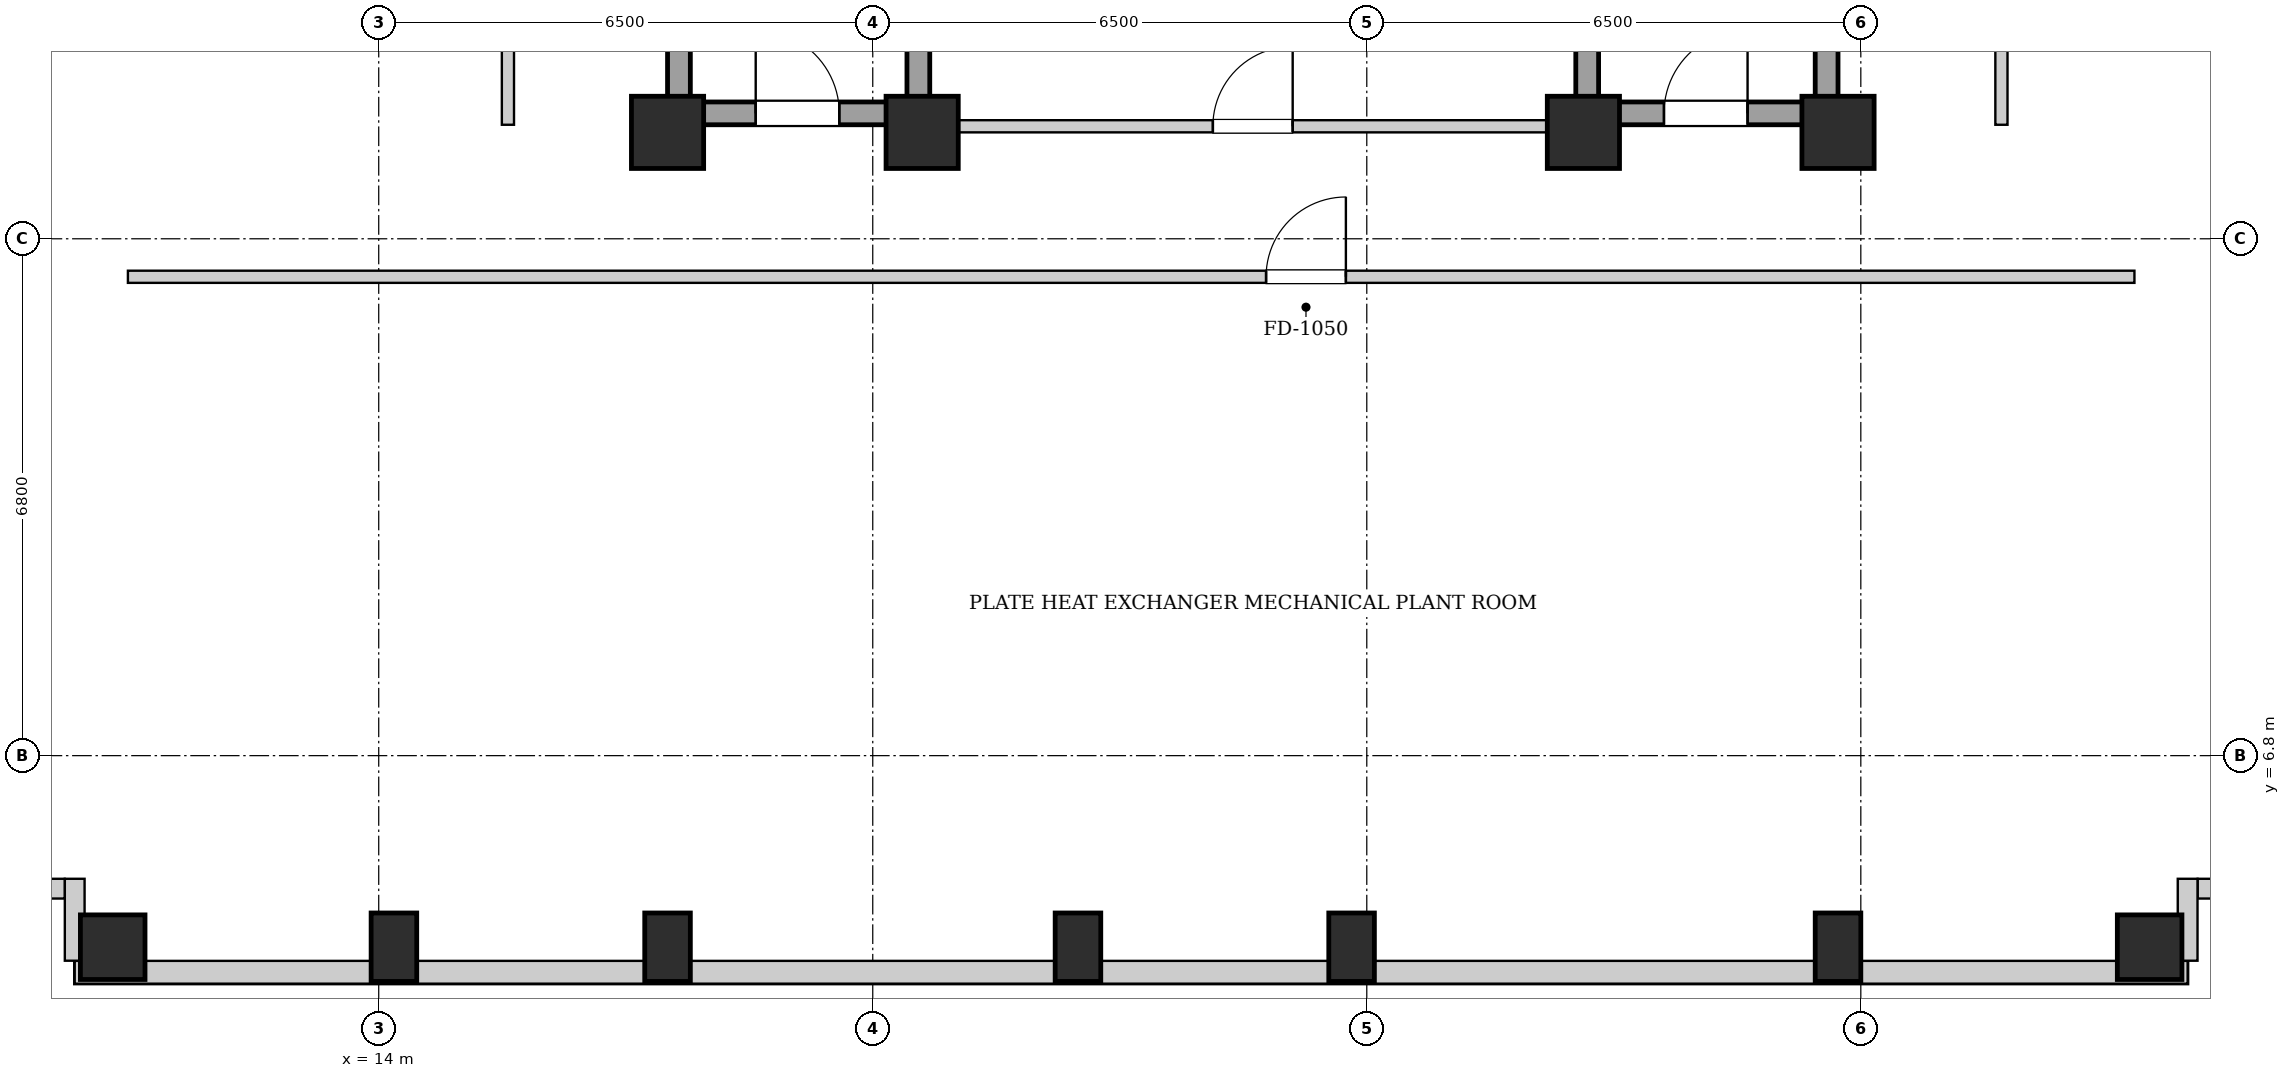
"""IFC4 building model, lengths in metres.
Left out: names, types, materials, properties, quantities, classifications, styles, units other than length and angle.
Written with IfcOpenShell. Run it as: python <this file> out.ifc"""

import sys

from ifc_helpers import new_model, si_unit, direction, frame, frame_2d, origin, origin_2d, place, context, subcontext, project, spatial, rectangle, extrude, element, fill, save


model = new_model("IFC4")
c1 = context("Model", 3, precision=1e-05, world=origin(), true_north=direction((0.0, 1.0)))
c2 = subcontext(c1, "Body", "Model", "MODEL_VIEW")
j1 = project(units=[si_unit("LENGTHUNIT", "METRE"), si_unit("PLANEANGLEUNIT", "RADIAN")], contexts=[c1])
p1 = place(None, origin())
s1 = spatial("IfcSite", under=j1, at=p1, CompositionType="ELEMENT")
p2 = place(p1, origin())
s2 = spatial("IfcBuilding", under=s1, at=p2, CompositionType="ELEMENT")
p3 = place(p2, frame((0.0, 0.0, 169.9)))
s3 = spatial("IfcBuildingStorey", under=s2, at=p3, CompositionType="ELEMENT", Elevation=169.9)
p4 = place(p3, frame((10.5, 4.28, 0.0), z_axis=(0.0, 0.0, 1.0), x_axis=(1.0, 0.0, 0.0)))
e1 = element("IfcColumn", 1, at=p4, inside=s3, PredefinedType="COLUMN", context=c2, shape_type="SweptSolid", body=[
    extrude(rectangle(XDim=0.85, YDim=0.85, at=origin_2d()), origin(), (0.0, 0.0, 1.0), 4.5),
])
for number, where, z_axis, x_axis in (
    (2, (14.2, 4.28, 0.0), (0.0, 0.0, 1.0), (1.0, 0.0, 0.0)),
    (3, (17.8, 4.28, 0.0), (0.0, 0.0, 1.0), (1.0, 0.0, 0.0)),
    (4, (23.2, 4.28, 0.0), (0.0, 0.0, 1.0), (1.0, 0.0, 0.0)),
    (5, (26.8, 4.28, 0.0), (0.0, 0.0, 1.0), (1.0, 0.0, 0.0)),
    (6, (33.2, 4.28, 0.0), (0.0, 0.0, 1.0), (1.0, 0.0, 0.0)),
):
    element("IfcColumn", number, at=place(p3, frame(where, z_axis=z_axis, x_axis=x_axis)), inside=s3, PredefinedType="COLUMN", context=c2, shape_type="SweptSolid", body=[
        extrude(rectangle(XDim=0.6, YDim=0.9, at=origin_2d()), origin(), (0.0, 0.0, 1.0), 4.5),
    ])
p5 = place(p3, frame((37.3, 4.28, 0.0), z_axis=(0.0, 0.0, 1.0), x_axis=(1.0, 0.0, 0.0)))
e7 = element("IfcColumn", 7, at=p5, inside=s3, PredefinedType="COLUMN", context=c2, shape_type="SweptSolid", body=[
    extrude(rectangle(XDim=0.85, YDim=0.85, at=origin_2d()), origin(), (0.0, 0.0, 1.0), 4.5),
])
for number, where, z_axis, x_axis in (
    (8, (17.8, 15.0, 0.0), (0.0, 0.0, 1.0), (1.0, 0.0, 0.0)),
    (9, (21.15, 15.0, 0.0), (0.0, 0.0, 1.0), (1.0, 0.0, 0.0)),
    (10, (29.85, 15.0, 0.0), (0.0, 0.0, 1.0), (1.0, 0.0, 0.0)),
    (11, (33.2, 15.0, 0.0), (0.0, 0.0, 1.0), (1.0, 0.0, 0.0)),
):
    element("IfcColumn", number, at=place(p3, frame(where, z_axis=z_axis, x_axis=x_axis)), inside=s3, PredefinedType="COLUMN", context=c2, shape_type="SweptSolid", body=[
        extrude(rectangle(XDim=0.95, YDim=0.95, at=origin_2d()), origin(), (0.0, 0.0, 1.0), 4.5),
    ])
p6 = place(p3, frame((37.8, 3.95, 0.0), z_axis=(0.0, 0.0, 1.0), x_axis=(-1.0, 0.0, 0.0)))
e12 = element("IfcWall", 12, at=p6, inside=s3, PredefinedType="SOLIDWALL", context=c2, shape_type="SweptSolid", body=[
    extrude(rectangle(XDim=27.8, YDim=0.3, at=frame_2d((13.9, 0.0))), origin(), (0.0, 0.0, 1.0), 1.965),
])
p7 = place(p3, frame((38.918, 5.05, 0.0), z_axis=(0.0, 0.0, 1.0), x_axis=(-1.0, 0.0, 0.0)))
e13 = element("IfcWall", 13, at=p7, inside=s3, PredefinedType="SOLIDWALL", context=c2, shape_type="SweptSolid", body=[
    extrude(rectangle(XDim=0.986, YDim=0.26, at=frame_2d((0.493, 0.0))), origin(), (0.0, 0.0, 1.0), 4.18),
])
for number, where, z_axis, x_axis in (
    (14, (37.8, 5.18, 0.0), (0.0, 0.0, 1.0), (0.0, -1.0, 0.0)),
    (15, (10.0, 4.102, 0.0), (0.0, 0.0, 1.0), (0.0, 1.0, 0.0)),
):
    element("IfcWall", number, at=place(p3, frame(where, z_axis=z_axis, x_axis=x_axis)), inside=s3, PredefinedType="SOLIDWALL", context=c2, shape_type="SweptSolid", body=[
        extrude(rectangle(XDim=1.078, YDim=0.26, at=frame_2d((0.539, 0.0))), origin(), (0.0, 0.0, 1.0), 4.18),
    ])
p8 = place(p3, frame((9.868, 5.05, 0.0), z_axis=(0.0, 0.0, 1.0), x_axis=(-1.0, 0.0, 0.0)))
e16 = element("IfcWall", 16, at=p8, inside=s3, PredefinedType="SOLIDWALL", context=c2, shape_type="SweptSolid", body=[
    extrude(rectangle(XDim=1.248, YDim=0.26, at=frame_2d((0.624, 0.0))), origin(), (0.0, 0.0, 1.0), 4.18),
])
for number, where, z_axis, x_axis in (
    (17, (17.95, 15.1, 0.0), (0.0, 0.0, 1.0), (0.0, 1.0, 0.0)),
    (18, (21.1, 15.1, 0.0), (0.0, 0.0, 1.0), (0.0, 1.0, 0.0)),
):
    element("IfcWall", number, at=place(p3, frame(where, z_axis=z_axis, x_axis=x_axis)), inside=s3, PredefinedType="SHEAR", context=c2, shape_type="SweptSolid", body=[
        extrude(rectangle(XDim=9.0, YDim=0.3, at=frame_2d((4.5, 0.0))), origin(), (0.0, 0.0, 1.0), 4.18),
    ])
p9 = place(p3, frame((18.1, 15.25, 0.0), z_axis=(0.0, 0.0, 1.0), x_axis=(1.0, 0.0, 0.0)))
e19 = element("IfcWall", 19, at=p9, inside=s3, PredefinedType="SHEAR", context=c2, shape_type="SweptSolid", body=[
    extrude(rectangle(XDim=2.85, YDim=0.3, at=frame_2d((1.425, 0.0))), origin(), (0.0, 0.0, 1.0), 4.18),
])
p10 = place(p9, frame((0.86, 0.0, 0.0)))
e20 = element("IfcOpeningElement", 20, at=p10, cuts=e19, PredefinedType="OPENING", context=c2, shape_type="SweptSolid", body=[
    extrude(rectangle(XDim=1.1, YDim=2.05, at=frame_2d((0.55, 1.025))), frame((0.0, 0.16, 0.0), z_axis=(0.0, -1.0, 0.0), x_axis=(1.0, 0.0, 0.0)), (0.0, 0.0, 1.0), 0.32),
])
for number, where, z_axis, x_axis in (
    (21, (29.9, 15.1, 0.0), (0.0, 0.0, 1.0), (0.0, 1.0, 0.0)),
    (22, (33.05, 15.1, 0.0), (0.0, 0.0, 1.0), (0.0, 1.0, 0.0)),
):
    element("IfcWall", number, at=place(p3, frame(where, z_axis=z_axis, x_axis=x_axis)), inside=s3, PredefinedType="SHEAR", context=c2, shape_type="SweptSolid", body=[
        extrude(rectangle(XDim=9.0, YDim=0.3, at=frame_2d((4.5, 0.0))), origin(), (0.0, 0.0, 1.0), 4.18),
    ])
p11 = place(p3, frame((30.05, 15.25, 0.0), z_axis=(0.0, 0.0, 1.0), x_axis=(1.0, 0.0, 0.0)))
e23 = element("IfcWall", 23, at=p11, inside=s3, PredefinedType="SHEAR", context=c2, shape_type="SweptSolid", body=[
    extrude(rectangle(XDim=2.85, YDim=0.3, at=frame_2d((1.425, 0.0))), origin(), (0.0, 0.0, 1.0), 4.18),
])
p12 = place(p11, frame((0.86, 0.0, 0.0)))
e24 = element("IfcOpeningElement", 24, at=p12, cuts=e23, PredefinedType="OPENING", context=c2, shape_type="SweptSolid", body=[
    extrude(rectangle(XDim=1.1, YDim=2.05, at=frame_2d((0.55, 1.025))), frame((0.0, 0.16, 0.0), z_axis=(0.0, -1.0, 0.0), x_axis=(1.0, 0.0, 0.0)), (0.0, 0.0, 1.0), 0.32),
])
p13 = place(p3, frame((21.25, 15.08, 0.0), z_axis=(0.0, 0.0, 1.0), x_axis=(1.0, 0.0, 0.0)))
e25 = element("IfcWall", 25, at=p13, inside=s3, PredefinedType="PARTITIONING", context=c2, shape_type="SweptSolid", body=[
    extrude(rectangle(XDim=8.5, YDim=0.16, at=frame_2d((4.25, 0.0))), origin(), (0.0, 0.0, 1.0), 4.18),
])
p14 = place(p13, frame((3.725, 0.0, 0.0)))
e26 = element("IfcOpeningElement", 26, at=p14, cuts=e25, PredefinedType="OPENING", context=c2, shape_type="SweptSolid", body=[
    extrude(rectangle(XDim=1.05, YDim=2.05, at=frame_2d((0.525, 1.025))), frame((0.0, 0.09, 0.0), z_axis=(0.0, -1.0, 0.0), x_axis=(1.0, 0.0, 0.0)), (0.0, 0.0, 1.0), 0.18),
])
p15 = place(p3, frame((10.7, 13.1, 0.0), z_axis=(0.0, 0.0, 1.0), x_axis=(1.0, 0.0, 0.0)))
e27 = element("IfcWall", 27, at=p15, inside=s3, PredefinedType="PARTITIONING", context=c2, shape_type="SweptSolid", body=[
    extrude(rectangle(XDim=26.4, YDim=0.16, at=frame_2d((13.2, 0.0))), origin(), (0.0, 0.0, 1.0), 4.18),
])
p16 = place(p15, frame((14.975, 0.0, 0.0)))
e28 = element("IfcOpeningElement", 28, at=p16, cuts=e27, PredefinedType="OPENING", context=c2, shape_type="SweptSolid", body=[
    extrude(rectangle(XDim=1.05, YDim=2.05, at=frame_2d((0.525, 1.025))), frame((0.0, 0.09, 0.0), z_axis=(0.0, -1.0, 0.0), x_axis=(1.0, 0.0, 0.0)), (0.0, 0.0, 1.0), 0.18),
])
p17 = place(p3, frame((15.7, 15.1, 0.0), z_axis=(0.0, 0.0, 1.0), x_axis=(0.0, 1.0, 0.0)))
e29 = element("IfcWall", 29, at=p17, inside=s3, PredefinedType="PARTITIONING", context=c2, shape_type="SweptSolid", body=[
    extrude(rectangle(XDim=13.8, YDim=0.16, at=frame_2d((6.9, 0.0))), origin(), (0.0, 0.0, 1.0), 4.18),
])
p18 = place(p17, frame((6.475, 0.0, 0.0)))
e30 = element("IfcOpeningElement", 30, at=p18, cuts=e29, PredefinedType="OPENING", context=c2, shape_type="SweptSolid", body=[
    extrude(rectangle(XDim=1.05, YDim=2.05, at=frame_2d((0.525, 1.025))), frame((0.0, 0.09, 0.0), z_axis=(0.0, -1.0, 0.0), x_axis=(1.0, 0.0, 0.0)), (0.0, 0.0, 1.0), 0.18),
])
p19 = place(p3, frame((35.35, 15.1, 0.0), z_axis=(0.0, 0.0, 1.0), x_axis=(0.0, 1.0, 0.0)))
e31 = element("IfcWall", 31, at=p19, inside=s3, PredefinedType="PARTITIONING", context=c2, shape_type="SweptSolid", body=[
    extrude(rectangle(XDim=13.8, YDim=0.16, at=frame_2d((6.9, 0.0))), origin(), (0.0, 0.0, 1.0), 4.18),
])
p20 = place(p19, frame((6.475, 0.0, 0.0)))
e32 = element("IfcOpeningElement", 32, at=p20, cuts=e31, PredefinedType="OPENING", context=c2, shape_type="SweptSolid", body=[
    extrude(rectangle(XDim=1.05, YDim=2.05, at=frame_2d((0.525, 1.025))), frame((0.0, 0.09, 0.0), z_axis=(0.0, -1.0, 0.0), x_axis=(1.0, 0.0, 0.0)), (0.0, 0.0, 1.0), 0.18),
])
p21 = place(p10, origin())
e33 = element("IfcDoor", 33, at=p21, inside=s3, OperationType="SINGLE_SWING_LEFT", PredefinedType="DOOR", context=c2, shape_type="SweptSolid", body=[
    extrude(rectangle(XDim=1.1, YDim=2.05, at=frame_2d((0.55, 1.025))), frame((0.0, 0.025, 0.0), z_axis=(0.0, -1.0, 0.0), x_axis=(1.0, 0.0, 0.0)), (0.0, 0.0, 1.0), 0.05),
])
fill(e20, e33)
p22 = place(p12, origin())
e34 = element("IfcDoor", 34, at=p22, inside=s3, OperationType="SINGLE_SWING_RIGHT", PredefinedType="DOOR", context=c2, shape_type="SweptSolid", body=[
    extrude(rectangle(XDim=1.1, YDim=2.05, at=frame_2d((0.55, 1.025))), frame((0.0, 0.025, 0.0), z_axis=(0.0, -1.0, 0.0), x_axis=(1.0, 0.0, 0.0)), (0.0, 0.0, 1.0), 0.05),
])
fill(e24, e34)
p23 = place(p14, origin())
e35 = element("IfcDoor", 35, at=p23, inside=s3, OperationType="SINGLE_SWING_RIGHT", PredefinedType="DOOR", context=c2, shape_type="SweptSolid", body=[
    extrude(rectangle(XDim=1.05, YDim=2.05, at=frame_2d((0.525, 1.025))), frame((0.0, 0.025, 0.0), z_axis=(0.0, -1.0, 0.0), x_axis=(1.0, 0.0, 0.0)), (0.0, 0.0, 1.0), 0.05),
])
fill(e26, e35)
p24 = place(p16, origin())
e36 = element("IfcDoor", 36, at=p24, inside=s3, OperationType="SINGLE_SWING_RIGHT", PredefinedType="DOOR", context=c2, shape_type="SweptSolid", body=[
    extrude(rectangle(XDim=1.05, YDim=2.05, at=frame_2d((0.525, 1.025))), frame((0.0, 0.025, 0.0), z_axis=(0.0, -1.0, 0.0), x_axis=(1.0, 0.0, 0.0)), (0.0, 0.0, 1.0), 0.05),
])
fill(e28, e36)
save(model, sys.argv[1])
